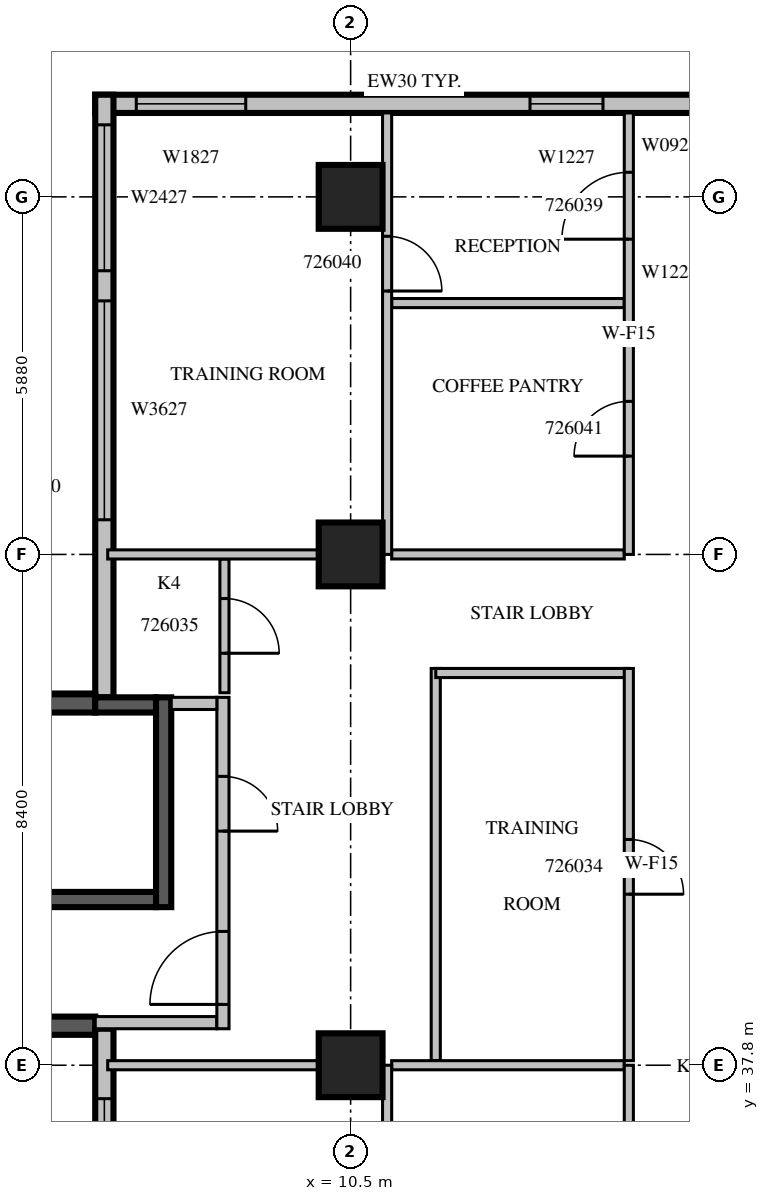
"""IFC4 building model, lengths in metres.
Left out: names, types, materials, properties, quantities, classifications, styles, units other than length and angle.
Written with IfcOpenShell. Run it as: python <this file> out.ifc"""

import sys

from ifc_helpers import new_model, si_unit, direction, frame, frame_2d, origin, origin_2d, place, context, subcontext, project, spatial, rectangle, extrude, source, transform, mapped, element, fill, save


model = new_model("IFC4")
c1 = context("Model", 3, precision=1e-05, world=origin(), true_north=direction((0.0, 1.0)))
c2 = subcontext(c1, "Body", "Model", "MODEL_VIEW")
j1 = project(units=[si_unit("LENGTHUNIT", "METRE"), si_unit("PLANEANGLEUNIT", "RADIAN")], contexts=[c1])
p1 = place(None, origin())
s1 = spatial("IfcSite", under=j1, at=p1, CompositionType="ELEMENT")
p2 = place(p1, origin())
s2 = spatial("IfcBuilding", under=s1, at=p2, CompositionType="ELEMENT")
p3 = place(p2, frame((0.0, 0.0, 120.3)))
s3 = spatial("IfcBuildingStorey", under=s2, at=p3, CompositionType="ELEMENT", Elevation=120.3)
m1 = source(origin(), c2, "Body", "SweptSolid", [
    extrude(rectangle(XDim=1.05, YDim=1.05, at=origin_2d()), origin(), (0.0, 0.0, 1.0), 4.2),
])
for number, where, z_axis, x_axis in (
    (1, (10.5, 37.8, 0.0), (0.0, 0.0, 1.0), (1.0, 0.0, 0.0)),
    (2, (10.5, 46.2, 0.0), (0.0, 0.0, 1.0), (1.0, 0.0, 0.0)),
    (3, (10.5, 52.08, 0.0), (0.0, 0.0, 1.0), (1.0, 0.0, 0.0)),
):
    element("IfcColumn", number, at=place(p3, frame(where, z_axis=z_axis, x_axis=x_axis)), inside=s3, PredefinedType="COLUMN", context=c2, shape_type="MappedRepresentation", body=[
        mapped(m1, transform((0.0, 0.0, 0.0), scale=1.0)),
    ])
m2 = source(origin(), c2, "Body", "SweptSolid", [
    extrude(rectangle(XDim=10.5, YDim=0.3, at=frame_2d((5.25, 0.0))), origin(), (0.0, 0.0, 1.0), 3.8),
])
p4 = place(p3, frame((16.8, 53.61, 0.0), z_axis=(0.0, 0.0, 1.0), x_axis=(-1.0, 0.0, 0.0)))
e4 = element("IfcWall", 4, at=p4, inside=s3, PredefinedType="STANDARD", context=c2, shape_type="MappedRepresentation", body=[
    mapped(m2, transform((0.0, 0.0, 0.0), scale=1.0)),
])
m3 = source(origin(), c2, "Body", "SweptSolid", [
    extrude(rectangle(XDim=1.2, YDim=2.7, at=frame_2d((0.6, 1.35))), frame((0.0, 0.16, 0.0), z_axis=(0.0, -1.0, 0.0), x_axis=(1.0, 0.0, 0.0)), (0.0, 0.0, 1.0), 0.32),
])
p5 = place(p4, frame((2.15, 0.0, 0.6)))
e5 = element("IfcOpeningElement", 5, at=p5, cuts=e4, PredefinedType="OPENING", context=c2, shape_type="MappedRepresentation", body=[
    mapped(m3, transform((0.0, 0.0, 0.0), scale=1.0)),
])
m4 = source(origin(), c2, "Body", "SweptSolid", [
    extrude(rectangle(XDim=1.8, YDim=2.7, at=frame_2d((0.9, 1.35))), frame((0.0, 0.16, 0.0), z_axis=(0.0, -1.0, 0.0), x_axis=(1.0, 0.0, 0.0)), (0.0, 0.0, 1.0), 0.32),
])
p6 = place(p4, frame((8.025, 0.0, 0.6)))
e6 = element("IfcOpeningElement", 6, at=p6, cuts=e4, PredefinedType="OPENING", context=c2, shape_type="MappedRepresentation", body=[
    mapped(m4, transform((0.0, 0.0, 0.0), scale=1.0)),
])
m5 = source(origin(), c2, "Body", "SweptSolid", [
    extrude(rectangle(XDim=9.91, YDim=0.3, at=frame_2d((4.955, 0.0))), origin(), (0.0, 0.0, 1.0), 3.8),
])
p7 = place(p3, frame((6.45, 53.76, 0.0), z_axis=(0.0, 0.0, 1.0), x_axis=(0.0, -1.0, 0.0)))
e7 = element("IfcWall", 7, at=p7, inside=s3, PredefinedType="STANDARD", context=c2, shape_type="MappedRepresentation", body=[
    mapped(m5, transform((0.0, 0.0, 0.0), scale=1.0)),
])
m6 = source(origin(), c2, "Body", "SweptSolid", [
    extrude(rectangle(XDim=3.6, YDim=2.7, at=frame_2d((1.8, 1.35))), frame((0.0, 0.16, 0.0), z_axis=(0.0, -1.0, 0.0), x_axis=(1.0, 0.0, 0.0)), (0.0, 0.0, 1.0), 0.32),
])
p8 = place(p7, frame((3.39, 0.0, 0.6)))
e8 = element("IfcOpeningElement", 8, at=p8, cuts=e7, PredefinedType="OPENING", context=c2, shape_type="MappedRepresentation", body=[
    mapped(m6, transform((0.0, 0.0, 0.0), scale=1.0)),
])
m7 = source(origin(), c2, "Body", "SweptSolid", [
    extrude(rectangle(XDim=2.4, YDim=2.7, at=frame_2d((1.2, 1.35))), frame((0.0, 0.16, 0.0), z_axis=(0.0, -1.0, 0.0), x_axis=(1.0, 0.0, 0.0)), (0.0, 0.0, 1.0), 0.32),
])
p9 = place(p7, frame((0.495, 0.0, 0.6)))
e9 = element("IfcOpeningElement", 9, at=p9, cuts=e7, PredefinedType="OPENING", context=c2, shape_type="MappedRepresentation", body=[
    mapped(m7, transform((0.0, 0.0, 0.0), scale=1.0)),
])
m8 = source(origin(), c2, "Body", "SweptSolid", [
    extrude(rectangle(XDim=6.1, YDim=0.3, at=frame_2d((3.05, 0.0))), origin(), (0.0, 0.0, 1.0), 3.8),
])
for number, where, z_axis, x_axis in (
    (10, (6.3, 43.75, 0.0), (0.0, 0.0, 1.0), (-1.0, 0.0, 0.0)),
    (11, (0.2, 38.45, 0.0), (0.0, 0.0, 1.0), (1.0, 0.0, 0.0)),
):
    element("IfcWall", number, at=place(p3, frame(where, z_axis=z_axis, x_axis=x_axis)), inside=s3, PredefinedType="SOLIDWALL", context=c2, shape_type="MappedRepresentation", body=[
        mapped(m8, transform((0.0, 0.0, 0.0), scale=1.0)),
    ])
m9 = source(origin(), c2, "Body", "SweptSolid", [
    extrude(rectangle(XDim=4.2, YDim=0.3, at=frame_2d((2.1, 0.0))), origin(), (0.0, 0.0, 1.0), 3.8),
])
p10 = place(p3, frame((6.45, 38.4, 0.0), z_axis=(0.0, 0.0, 1.0), x_axis=(0.0, -1.0, 0.0)))
e12 = element("IfcWall", 12, at=p10, inside=s3, PredefinedType="STANDARD", context=c2, shape_type="MappedRepresentation", body=[
    mapped(m9, transform((0.0, 0.0, 0.0), scale=1.0)),
])
p11 = place(p10, frame((1.15, 0.0, 0.6)))
e13 = element("IfcOpeningElement", 13, at=p11, cuts=e12, PredefinedType="OPENING", context=c2, shape_type="MappedRepresentation", body=[
    mapped(m4, transform((0.0, 0.0, 0.0), scale=1.0)),
])
m10 = source(origin(), c2, "Body", "SweptSolid", [
    extrude(rectangle(XDim=7.0, YDim=0.25, at=frame_2d((3.5, 0.0))), origin(), (0.0, 0.0, 1.0), 3.8),
])
p12 = place(p3, frame((0.3, 40.525, 0.0), z_axis=(0.0, 0.0, 1.0), x_axis=(1.0, 0.0, 0.0)))
e14 = element("IfcWall", 14, at=p12, inside=s3, PredefinedType="SOLIDWALL", context=c2, shape_type="MappedRepresentation", body=[
    mapped(m10, transform((0.0, 0.0, 0.0), scale=1.0)),
])
m11 = source(origin(), c2, "Body", "SweptSolid", [
    extrude(rectangle(XDim=1.1, YDim=2.1, at=frame_2d((0.55, 1.05))), frame((0.0, 0.135, 0.0), z_axis=(0.0, -1.0, 0.0), x_axis=(1.0, 0.0, 0.0)), (0.0, 0.0, 1.0), 0.27),
])
p13 = place(p12, frame((0.55, 0.0, 0.0)))
e15 = element("IfcOpeningElement", 15, at=p13, cuts=e14, PredefinedType="OPENING", context=c2, shape_type="MappedRepresentation", body=[
    mapped(m11, transform((0.0, 0.0, 0.0), scale=1.0)),
])
m12 = source(origin(), c2, "Body", "SweptSolid", [
    extrude(rectangle(XDim=1.0, YDim=0.25, at=frame_2d((0.5, 0.0))), origin(), (0.0, 0.0, 1.0), 3.8),
])
p14 = place(p3, frame((6.3, 43.725, 0.0), z_axis=(0.0, 0.0, 1.0), x_axis=(1.0, 0.0, 0.0)))
e16 = element("IfcWall", 16, at=p14, inside=s3, PredefinedType="SOLIDWALL", context=c2, shape_type="MappedRepresentation", body=[
    mapped(m12, transform((0.0, 0.0, 0.0), scale=1.0)),
])
m13 = source(origin(), c2, "Body", "SweptSolid", [
    extrude(rectangle(XDim=3.45, YDim=0.25, at=frame_2d((1.725, 0.0))), origin(), (0.0, 0.0, 1.0), 3.8),
])
p15 = place(p3, frame((7.425, 40.4, 0.0), z_axis=(0.0, 0.0, 1.0), x_axis=(0.0, 1.0, 0.0)))
e17 = element("IfcWall", 17, at=p15, inside=s3, PredefinedType="SOLIDWALL", context=c2, shape_type="MappedRepresentation", body=[
    mapped(m13, transform((0.0, 0.0, 0.0), scale=1.0)),
])
m14 = source(origin(), c2, "Body", "SweptSolid", [
    extrude(rectangle(XDim=2.0, YDim=0.2, at=frame_2d((1.0, 0.0))), origin(), (0.0, 0.0, 1.0), 3.8),
])
p16 = place(p3, frame((6.3, 38.5, 0.0), z_axis=(0.0, 0.0, 1.0), x_axis=(1.0, 0.0, 0.0)))
e18 = element("IfcWall", 18, at=p16, inside=s3, PredefinedType="PARTITIONING", context=c2, shape_type="MappedRepresentation", body=[
    mapped(m14, transform((0.0, 0.0, 0.0), scale=1.0)),
])
m15 = source(origin(), c2, "Body", "SweptSolid", [
    extrude(rectangle(XDim=5.45, YDim=0.2, at=frame_2d((2.725, 0.0))), origin(), (0.0, 0.0, 1.0), 3.8),
])
p17 = place(p3, frame((8.4, 38.4, 0.0), z_axis=(0.0, 0.0, 1.0), x_axis=(0.0, 1.0, 0.0)))
e19 = element("IfcWall", 19, at=p17, inside=s3, PredefinedType="PARTITIONING", context=c2, shape_type="MappedRepresentation", body=[
    mapped(m15, transform((0.0, 0.0, 0.0), scale=1.0)),
])
m16 = source(origin(), c2, "Body", "SweptSolid", [
    extrude(rectangle(XDim=1.2, YDim=2.1, at=frame_2d((0.6, 1.05))), frame((0.0, 0.11, 0.0), z_axis=(0.0, -1.0, 0.0), x_axis=(1.0, 0.0, 0.0)), (0.0, 0.0, 1.0), 0.22),
])
p18 = place(p17, frame((0.4, 0.0, 0.0)))
e20 = element("IfcOpeningElement", 20, at=p18, cuts=e19, PredefinedType="OPENING", context=c2, shape_type="MappedRepresentation", body=[
    mapped(m16, transform((0.0, 0.0, 0.0), scale=1.0)),
])
m17 = source(origin(), c2, "Body", "SweptSolid", [
    extrude(rectangle(XDim=0.9, YDim=2.1, at=frame_2d((0.45, 1.05))), frame((0.0, 0.11, 0.0), z_axis=(0.0, -1.0, 0.0), x_axis=(1.0, 0.0, 0.0)), (0.0, 0.0, 1.0), 0.22),
])
p19 = place(p17, frame((3.25, 0.0, 0.0)))
e21 = element("IfcOpeningElement", 21, at=p19, cuts=e19, PredefinedType="OPENING", context=c2, shape_type="MappedRepresentation", body=[
    mapped(m17, transform((0.0, 0.0, 0.0), scale=1.0)),
])
m18 = source(origin(), c2, "Body", "SweptSolid", [
    extrude(rectangle(XDim=0.75, YDim=0.2, at=frame_2d((0.375, 0.0))), origin(), (0.0, 0.0, 1.0), 3.8),
])
p20 = place(p3, frame((7.55, 43.75, 0.0), z_axis=(0.0, 0.0, 1.0), x_axis=(1.0, 0.0, 0.0)))
e22 = element("IfcWall", 22, at=p20, inside=s3, PredefinedType="PARTITIONING", context=c2, shape_type="MappedRepresentation", body=[
    mapped(m18, transform((0.0, 0.0, 0.0), scale=1.0)),
])
m19 = source(origin(), c2, "Body", "SweptSolid", [
    extrude(rectangle(XDim=6.45, YDim=0.15, at=frame_2d((3.225, 0.0))), origin(), (0.0, 0.0, 1.0), 3.8),
])
p21 = place(p3, frame((11.9, 44.325, 0.0), z_axis=(0.0, 0.0, 1.0), x_axis=(0.0, -1.0, 0.0)))
e23 = element("IfcWall", 23, at=p21, inside=s3, PredefinedType="PARTITIONING", context=c2, shape_type="MappedRepresentation", body=[
    mapped(m19, transform((0.0, 0.0, 0.0), scale=1.0)),
])
m20 = source(origin(), c2, "Body", "SweptSolid", [
    extrude(rectangle(XDim=3.175, YDim=0.15, at=frame_2d((1.587, 0.0))), origin(), (0.0, 0.0, 1.0), 3.8),
])
p22 = place(p3, frame((15.075, 44.25, 0.0), z_axis=(0.0, 0.0, 1.0), x_axis=(-1.0, 0.0, 0.0)))
e24 = element("IfcWall", 24, at=p22, inside=s3, PredefinedType="PARTITIONING", context=c2, shape_type="MappedRepresentation", body=[
    mapped(m20, transform((0.0, 0.0, 0.0), scale=1.0)),
])
p23 = place(p3, frame((15.075, 37.875, 0.0), z_axis=(0.0, 0.0, 1.0), x_axis=(0.0, 1.0, 0.0)))
e25 = element("IfcWall", 25, at=p23, inside=s3, PredefinedType="PARTITIONING", context=c2, shape_type="MappedRepresentation", body=[
    mapped(m19, transform((0.0, 0.0, 0.0), scale=1.0)),
])
m21 = source(origin(), c2, "Body", "SweptSolid", [
    extrude(rectangle(XDim=0.9, YDim=2.1, at=frame_2d((0.45, 1.05))), frame((0.0, 0.085, 0.0), z_axis=(0.0, -1.0, 0.0), x_axis=(1.0, 0.0, 0.0)), (0.0, 0.0, 1.0), 0.17),
])
p24 = place(p23, frame((2.737, 0.0, 0.0)))
e26 = element("IfcOpeningElement", 26, at=p24, cuts=e25, PredefinedType="OPENING", context=c2, shape_type="MappedRepresentation", body=[
    mapped(m21, transform((0.0, 0.0, 0.0), scale=1.0)),
])
m22 = source(origin(), c2, "Body", "SweptSolid", [
    extrude(rectangle(XDim=2.2, YDim=0.15, at=frame_2d((1.1, 0.0))), origin(), (0.0, 0.0, 1.0), 3.8),
])
p25 = place(p3, frame((8.425, 43.925, 0.0), z_axis=(0.0, 0.0, 1.0), x_axis=(0.0, 1.0, 0.0)))
e27 = element("IfcWall", 27, at=p25, inside=s3, PredefinedType="PARTITIONING", context=c2, shape_type="MappedRepresentation", body=[
    mapped(m22, transform((0.0, 0.0, 0.0), scale=1.0)),
])
p26 = place(p25, frame((0.65, 0.0, 0.0)))
e28 = element("IfcOpeningElement", 28, at=p26, cuts=e27, PredefinedType="OPENING", context=c2, shape_type="MappedRepresentation", body=[
    mapped(m21, transform((0.0, 0.0, 0.0), scale=1.0)),
])
m23 = source(origin(), c2, "Body", "SweptSolid", [
    extrude(rectangle(XDim=3.471, YDim=0.15, at=frame_2d((1.736, 0.0))), origin(), (0.0, 0.0, 1.0), 3.8),
])
p27 = place(p3, frame((9.976, 37.8, 0.0), z_axis=(0.0, 0.0, 1.0), x_axis=(-1.0, 0.0, 0.0)))
e29 = element("IfcWall", 29, at=p27, inside=s3, PredefinedType="PARTITIONING", context=c2, shape_type="MappedRepresentation", body=[
    mapped(m23, transform((0.0, 0.0, 0.0), scale=1.0)),
])
m24 = source(origin(), c2, "Body", "SweptSolid", [
    extrude(rectangle(XDim=3.825, YDim=0.15, at=frame_2d((1.913, 0.0))), origin(), (0.0, 0.0, 1.0), 3.8),
])
p28 = place(p3, frame((15.0, 37.8, 0.0), z_axis=(0.0, 0.0, 1.0), x_axis=(-1.0, 0.0, 0.0)))
e30 = element("IfcWall", 30, at=p28, inside=s3, PredefinedType="PARTITIONING", context=c2, shape_type="MappedRepresentation", body=[
    mapped(m24, transform((0.0, 0.0, 0.0), scale=1.0)),
])
m25 = source(origin(), c2, "Body", "SweptSolid", [
    extrude(rectangle(XDim=8.4, YDim=0.15, at=frame_2d((4.2, 0.0))), origin(), (0.0, 0.0, 1.0), 3.8),
])
p29 = place(p3, frame((11.1, 29.4, 0.0), z_axis=(0.0, 0.0, 1.0), x_axis=(0.0, 1.0, 0.0)))
e31 = element("IfcWall", 31, at=p29, inside=s3, PredefinedType="PARTITIONING", context=c2, shape_type="MappedRepresentation", body=[
    mapped(m25, transform((0.0, 0.0, 0.0), scale=1.0)),
])
p30 = place(p29, frame((1.925, 0.0, 0.0)))
e32 = element("IfcOpeningElement", 32, at=p30, cuts=e31, PredefinedType="OPENING", context=c2, shape_type="MappedRepresentation", body=[
    mapped(m21, transform((0.0, 0.0, 0.0), scale=1.0)),
])
p31 = place(p29, frame((5.625, 0.0, 0.0)))
e33 = element("IfcOpeningElement", 33, at=p31, cuts=e31, PredefinedType="OPENING", context=c2, shape_type="MappedRepresentation", body=[
    mapped(m21, transform((0.0, 0.0, 0.0), scale=1.0)),
])
p32 = place(p3, frame((15.0, 50.334, 0.0), z_axis=(0.0, 0.0, 1.0), x_axis=(-1.0, 0.0, 0.0)))
e34 = element("IfcWall", 34, at=p32, inside=s3, PredefinedType="PARTITIONING", context=c2, shape_type="MappedRepresentation", body=[
    mapped(m24, transform((0.0, 0.0, 0.0), scale=1.0)),
])
p33 = place(p3, frame((9.976, 46.2, 0.0), z_axis=(0.0, 0.0, 1.0), x_axis=(-1.0, 0.0, 0.0)))
e35 = element("IfcWall", 35, at=p33, inside=s3, PredefinedType="PARTITIONING", context=c2, shape_type="MappedRepresentation", body=[
    mapped(m23, transform((0.0, 0.0, 0.0), scale=1.0)),
])
p34 = place(p3, frame((15.0, 46.2, 0.0), z_axis=(0.0, 0.0, 1.0), x_axis=(-1.0, 0.0, 0.0)))
e36 = element("IfcWall", 36, at=p34, inside=s3, PredefinedType="PARTITIONING", context=c2, shape_type="MappedRepresentation", body=[
    mapped(m24, transform((0.0, 0.0, 0.0), scale=1.0)),
])
m26 = source(origin(), c2, "Body", "SweptSolid", [
    extrude(rectangle(XDim=7.26, YDim=0.15, at=frame_2d((3.63, 0.0))), origin(), (0.0, 0.0, 1.0), 3.8),
])
p35 = place(p3, frame((11.1, 46.2, 0.0), z_axis=(0.0, 0.0, 1.0), x_axis=(0.0, 1.0, 0.0)))
e37 = element("IfcWall", 37, at=p35, inside=s3, PredefinedType="PARTITIONING", context=c2, shape_type="MappedRepresentation", body=[
    mapped(m26, transform((0.0, 0.0, 0.0), scale=1.0)),
])
p36 = place(p35, frame((4.332, 0.0, 0.0)))
e38 = element("IfcOpeningElement", 38, at=p36, cuts=e37, PredefinedType="OPENING", context=c2, shape_type="MappedRepresentation", body=[
    mapped(m21, transform((0.0, 0.0, 0.0), scale=1.0)),
])
p37 = place(p3, frame((15.075, 29.4, 0.0), z_axis=(0.0, 0.0, 1.0), x_axis=(0.0, 1.0, 0.0)))
e39 = element("IfcWall", 39, at=p37, inside=s3, PredefinedType="PARTITIONING", context=c2, shape_type="MappedRepresentation", body=[
    mapped(m25, transform((0.0, 0.0, 0.0), scale=1.0)),
])
m27 = source(origin(), c2, "Body", "SweptSolid", [
    extrude(rectangle(XDim=1.2, YDim=2.1, at=frame_2d((0.6, 1.05))), frame((0.0, 0.085, 0.0), z_axis=(0.0, -1.0, 0.0), x_axis=(1.0, 0.0, 0.0)), (0.0, 0.0, 1.0), 0.17),
])
p38 = place(p37, frame((3.6, 0.0, 0.0)))
e40 = element("IfcOpeningElement", 40, at=p38, cuts=e39, PredefinedType="OPENING", context=c2, shape_type="MappedRepresentation", body=[
    mapped(m27, transform((0.0, 0.0, 0.0), scale=1.0)),
])
p39 = place(p3, frame((15.075, 46.2, 0.0), z_axis=(0.0, 0.0, 1.0), x_axis=(0.0, 1.0, 0.0)))
e41 = element("IfcWall", 41, at=p39, inside=s3, PredefinedType="PARTITIONING", context=c2, shape_type="MappedRepresentation", body=[
    mapped(m26, transform((0.0, 0.0, 0.0), scale=1.0)),
])
m28 = source(origin(), c2, "Body", "SweptSolid", [
    extrude(rectangle(XDim=1.1, YDim=2.1, at=frame_2d((0.55, 1.05))), frame((0.0, 0.085, 0.0), z_axis=(0.0, -1.0, 0.0), x_axis=(1.0, 0.0, 0.0)), (0.0, 0.0, 1.0), 0.17),
])
p40 = place(p39, frame((5.184, 0.0, 0.0)))
e42 = element("IfcOpeningElement", 42, at=p40, cuts=e41, PredefinedType="OPENING", context=c2, shape_type="MappedRepresentation", body=[
    mapped(m28, transform((0.0, 0.0, 0.0), scale=1.0)),
])
p41 = place(p39, frame((1.617, 0.0, 0.0)))
e43 = element("IfcOpeningElement", 43, at=p41, cuts=e41, PredefinedType="OPENING", context=c2, shape_type="MappedRepresentation", body=[
    mapped(m21, transform((0.0, 0.0, 0.0), scale=1.0)),
])
m29 = source(origin(), c2, "Body", "SweptSolid", [
    extrude(rectangle(XDim=1.2, YDim=2.7, at=frame_2d((0.6, 1.35))), frame((0.0, 0.03, 0.0), z_axis=(0.0, -1.0, 0.0), x_axis=(1.0, 0.0, 0.0)), (0.0, 0.0, 1.0), 0.06),
])
p42 = place(p5, origin())
e44 = element("IfcWindow", 44, at=p42, inside=s3, PartitioningType="SINGLE_PANEL", PredefinedType="WINDOW", context=c2, shape_type="MappedRepresentation", body=[
    mapped(m29, transform((0.0, 0.0, 0.0), scale=1.0)),
])
fill(e5, e44)
m30 = source(origin(), c2, "Body", "SweptSolid", [
    extrude(rectangle(XDim=1.8, YDim=2.7, at=frame_2d((0.9, 1.35))), frame((0.0, 0.03, 0.0), z_axis=(0.0, -1.0, 0.0), x_axis=(1.0, 0.0, 0.0)), (0.0, 0.0, 1.0), 0.06),
])
p43 = place(p6, origin())
e45 = element("IfcWindow", 45, at=p43, inside=s3, PartitioningType="SINGLE_PANEL", PredefinedType="WINDOW", context=c2, shape_type="MappedRepresentation", body=[
    mapped(m30, transform((0.0, 0.0, 0.0), scale=1.0)),
])
fill(e6, e45)
m31 = source(origin(), c2, "Body", "SweptSolid", [
    extrude(rectangle(XDim=3.6, YDim=2.7, at=frame_2d((1.8, 1.35))), frame((0.0, 0.03, 0.0), z_axis=(0.0, -1.0, 0.0), x_axis=(1.0, 0.0, 0.0)), (0.0, 0.0, 1.0), 0.06),
])
p44 = place(p8, origin())
e46 = element("IfcWindow", 46, at=p44, inside=s3, PartitioningType="SINGLE_PANEL", PredefinedType="WINDOW", context=c2, shape_type="MappedRepresentation", body=[
    mapped(m31, transform((0.0, 0.0, 0.0), scale=1.0)),
])
fill(e8, e46)
m32 = source(origin(), c2, "Body", "SweptSolid", [
    extrude(rectangle(XDim=2.4, YDim=2.7, at=frame_2d((1.2, 1.35))), frame((0.0, 0.03, 0.0), z_axis=(0.0, -1.0, 0.0), x_axis=(1.0, 0.0, 0.0)), (0.0, 0.0, 1.0), 0.06),
])
p45 = place(p9, origin())
e47 = element("IfcWindow", 47, at=p45, inside=s3, PartitioningType="SINGLE_PANEL", PredefinedType="WINDOW", context=c2, shape_type="MappedRepresentation", body=[
    mapped(m32, transform((0.0, 0.0, 0.0), scale=1.0)),
])
fill(e9, e47)
p46 = place(p11, origin())
e48 = element("IfcWindow", 48, at=p46, inside=s3, PartitioningType="SINGLE_PANEL", PredefinedType="WINDOW", context=c2, shape_type="MappedRepresentation", body=[
    mapped(m30, transform((0.0, 0.0, 0.0), scale=1.0)),
])
fill(e13, e48)
m33 = source(origin(), c2, "Body", "SweptSolid", [
    extrude(rectangle(XDim=1.2, YDim=2.1, at=frame_2d((0.6, 1.05))), frame((0.0, 0.025, 0.0), z_axis=(0.0, -1.0, 0.0), x_axis=(1.0, 0.0, 0.0)), (0.0, 0.0, 1.0), 0.05),
])
p47 = place(p18, origin())
e49 = element("IfcDoor", 49, at=p47, inside=s3, OperationType="SINGLE_SWING_LEFT", PredefinedType="DOOR", context=c2, shape_type="MappedRepresentation", body=[
    mapped(m33, transform((0.0, 0.0, 0.0), scale=1.0)),
])
fill(e20, e49)
m34 = source(origin(), c2, "Body", "SweptSolid", [
    extrude(rectangle(XDim=0.9, YDim=2.1, at=frame_2d((0.45, 1.05))), frame((0.0, 0.025, 0.0), z_axis=(0.0, -1.0, 0.0), x_axis=(1.0, 0.0, 0.0)), (0.0, 0.0, 1.0), 0.05),
])
p48 = place(p19, origin())
e50 = element("IfcDoor", 50, at=p48, inside=s3, OperationType="SINGLE_SWING_RIGHT", PredefinedType="DOOR", context=c2, shape_type="MappedRepresentation", body=[
    mapped(m34, transform((0.0, 0.0, 0.0), scale=1.0)),
])
fill(e21, e50)
p49 = place(p24, origin())
e51 = element("IfcDoor", 51, at=p49, inside=s3, OperationType="SINGLE_SWING_RIGHT", PredefinedType="DOOR", context=c2, shape_type="MappedRepresentation", body=[
    mapped(m34, transform((0.0, 0.0, 0.0), scale=1.0)),
])
fill(e26, e51)
p50 = place(p26, origin())
e52 = element("IfcDoor", 52, at=p50, inside=s3, OperationType="SINGLE_SWING_RIGHT", PredefinedType="DOOR", context=c2, shape_type="MappedRepresentation", body=[
    mapped(m34, transform((0.0, 0.0, 0.0), scale=1.0)),
])
fill(e28, e52)
m35 = source(origin(), c2, "Body", "SweptSolid", [
    extrude(rectangle(XDim=1.1, YDim=2.1, at=frame_2d((0.55, 1.05))), frame((0.0, 0.025, 0.0), z_axis=(0.0, -1.0, 0.0), x_axis=(1.0, 0.0, 0.0)), (0.0, 0.0, 1.0), 0.05),
])
p51 = place(p40, origin())
e53 = element("IfcDoor", 53, at=p51, inside=s3, OperationType="SINGLE_SWING_LEFT", PredefinedType="DOOR", context=c2, shape_type="MappedRepresentation", body=[
    mapped(m35, transform((0.0, 0.0, 0.0), scale=1.0)),
])
fill(e42, e53)
p52 = place(p36, origin())
e54 = element("IfcDoor", 54, at=p52, inside=s3, OperationType="SINGLE_SWING_RIGHT", PredefinedType="DOOR", context=c2, shape_type="MappedRepresentation", body=[
    mapped(m34, transform((0.0, 0.0, 0.0), scale=1.0)),
])
fill(e38, e54)
p53 = place(p41, origin())
e55 = element("IfcDoor", 55, at=p53, inside=s3, OperationType="SINGLE_SWING_LEFT", PredefinedType="DOOR", context=c2, shape_type="MappedRepresentation", body=[
    mapped(m34, transform((0.0, 0.0, 0.0), scale=1.0)),
])
fill(e43, e55)
save(model, sys.argv[1])
